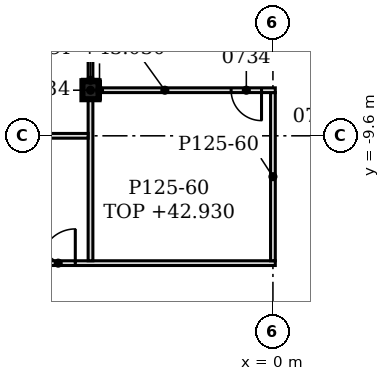
"""IFC4 building model, lengths in metres.
Left out: names, types, materials, properties, quantities, classifications, styles, units other than length and angle.
Written with IfcOpenShell. Run it as: python <this file> out.ifc"""

import sys

from ifc_helpers import new_model, si_unit, direction, frame, frame_2d, origin, origin_2d, place, context, subcontext, project, spatial, polyline, rectangle, i_section, outline, extrude, element, fill, save


model = new_model("IFC4")
c1 = context("Model", 3, precision=1e-05, world=origin(), true_north=direction((0.0, 1.0)))
c2 = subcontext(c1, "Body", "Model", "MODEL_VIEW")
j1 = project(units=[si_unit("LENGTHUNIT", "METRE"), si_unit("PLANEANGLEUNIT", "RADIAN")], contexts=[c1])
p1 = place(None, origin())
s1 = spatial("IfcSite", under=j1, at=p1, CompositionType="ELEMENT")
p2 = place(p1, origin())
s2 = spatial("IfcBuilding", under=s1, at=p2, CompositionType="ELEMENT")
p3 = place(p2, frame((0.0, 0.0, 40.2)))
s3 = spatial("IfcBuildingStorey", under=s2, at=p3, CompositionType="ELEMENT", Elevation=40.2)
p4 = place(p3, frame((-4.8, -8.4, -0.15), z_axis=(0.0, 0.0, 1.0), x_axis=(1.0, 0.0, 0.0)))
e1 = element("IfcColumn", 1, at=p4, inside=s3, PredefinedType="COLUMN", context=c2, shape_type="SweptSolid", body=[
    extrude(i_section(OverallWidth=0.424, OverallDepth=0.474, WebThickness=0.048, FlangeThickness=0.077, FilletRadius=0.015, at=origin_2d()), origin(), (0.0, 0.0, 1.0), 3.6),
])
p5 = place(p3, frame((-17.812, -12.95, 0.0), z_axis=(0.0, 0.0, 1.0), x_axis=(1.0, 0.0, 0.0)))
e2 = element("IfcWall", 2, at=p5, inside=s3, PredefinedType="PARTITIONING", context=c2, shape_type="SweptSolid", body=[
    extrude(outline(polyline([(0.0, 0.0), (17.875, 0.0), (17.875, 3.45), (13.163, 3.45), (13.16, 2.73), (12.863, 2.73), (12.861, 3.45), (3.562, 3.45), (3.561, 2.93), (3.262, 2.93), (3.26, 3.45), (0.0, 3.45), (0.0, 0.0)])), frame((0.0, 0.062, 0.0), z_axis=(0.0, -1.0, 0.0), x_axis=(1.0, 0.0, 0.0)), (0.0, 0.0, 1.0), 0.125),
])
p6 = place(p5, frame((11.712, 0.0, 0.0)))
e3 = element("IfcOpeningElement", 3, at=p6, cuts=e2, PredefinedType="OPENING", context=c2, shape_type="SweptSolid", body=[
    extrude(rectangle(XDim=0.9, YDim=2.1, at=frame_2d((0.45, 1.05))), frame((0.0, 0.073, 0.0), z_axis=(0.0, -1.0, 0.0), x_axis=(1.0, 0.0, 0.0)), (0.0, 0.0, 1.0), 0.145),
])
p7 = place(p3, frame((-4.8, -12.887, 0.0), z_axis=(0.0, 0.0, 1.0), x_axis=(0.0, 1.0, 0.0)))
e4 = element("IfcWall", 4, at=p7, inside=s3, PredefinedType="PARTITIONING", context=c2, shape_type="SweptSolid", body=[
    extrude(rectangle(XDim=4.25, YDim=0.125, at=frame_2d((2.125, 0.0))), origin(), (0.0, 0.0, 1.0), 2.73),
])
p8 = place(p3, frame((0.0, -12.887, 0.0), z_axis=(0.0, 0.0, 1.0), x_axis=(0.0, 1.0, 0.0)))
e5 = element("IfcWall", 5, at=p8, inside=s3, PredefinedType="PARTITIONING", context=c2, shape_type="SweptSolid", body=[
    extrude(outline(polyline([(0.0, 0.0), (4.425, 0.0), (4.425, 2.83), (4.337, 2.83), (4.335, 3.45), (0.0, 3.45), (0.0, 0.0)])), frame((0.0, 0.062, 0.0), z_axis=(0.0, -1.0, 0.0), x_axis=(1.0, 0.0, 0.0)), (0.0, 0.0, 1.0), 0.125),
])
p9 = place(p3, frame((-14.196, -9.6, 0.0), z_axis=(0.0, 0.0, 1.0), x_axis=(1.0, 0.0, 0.0)))
e6 = element("IfcWall", 6, at=p9, inside=s3, PredefinedType="PARTITIONING", context=c2, shape_type="SweptSolid", body=[
    extrude(outline(polyline([(0.0, 0.0), (9.333, 0.0), (9.333, 2.73), (9.246, 2.73), (9.243, 2.93), (0.0, 2.93), (0.0, 0.0)])), frame((0.0, 0.062, 0.0), z_axis=(0.0, -1.0, 0.0), x_axis=(1.0, 0.0, 0.0)), (0.0, 0.0, 1.0), 0.125),
])
p10 = place(p3, frame((-4.588, -8.4, 0.0), z_axis=(0.0, 0.0, 1.0), x_axis=(1.0, 0.0, 0.0)))
e7 = element("IfcWall", 7, at=p10, inside=s3, PredefinedType="PARTITIONING", context=c2, shape_type="SweptSolid", body=[
    extrude(rectangle(XDim=4.65, YDim=0.125, at=frame_2d((2.325, 0.0))), origin(), (0.0, 0.0, 1.0), 2.83),
])
p11 = place(p10, frame((3.488, 0.0, 0.0)))
e8 = element("IfcOpeningElement", 8, at=p11, cuts=e7, PredefinedType="OPENING", context=c2, shape_type="SweptSolid", body=[
    extrude(rectangle(XDim=0.8, YDim=2.1, at=frame_2d((0.4, 1.05))), frame((0.0, 0.073, 0.0), z_axis=(0.0, -1.0, 0.0), x_axis=(1.0, 0.0, 0.0)), (0.0, 0.0, 1.0), 0.145),
])
p12 = place(p3, frame((-4.8, -8.163, 0.0), z_axis=(0.0, 0.0, 1.0), x_axis=(0.0, 1.0, 0.0)))
e9 = element("IfcWall", 9, at=p12, inside=s3, PredefinedType="PARTITIONING", context=c2, shape_type="SweptSolid", body=[
    extrude(rectangle(XDim=8.101, YDim=0.125, at=frame_2d((4.05, 0.0))), origin(), (0.0, 0.0, 1.0), 2.83),
])
p13 = place(p12, frame((2.163, 0.0, 0.0)))
e10 = element("IfcOpeningElement", 10, at=p13, cuts=e9, PredefinedType="OPENING", context=c2, shape_type="SweptSolid", body=[
    extrude(rectangle(XDim=0.9, YDim=2.1, at=frame_2d((0.45, 1.05))), frame((0.0, 0.073, 0.0), z_axis=(0.0, -1.0, 0.0), x_axis=(1.0, 0.0, 0.0)), (0.0, 0.0, 1.0), 0.145),
])
p14 = place(p3, frame((-4.563, -8.637, 0.0), z_axis=(0.0, 0.0, 1.0), x_axis=(0.0, 1.0, 0.0)))
e11 = element("IfcWall", 11, at=p14, inside=s3, PredefinedType="PARTITIONING", context=c2, shape_type="SweptSolid", body=[
    extrude(rectangle(XDim=0.474, YDim=0.05, at=frame_2d((0.237, 0.0))), origin(), (0.0, 0.0, 1.0), 2.83),
])
p15 = place(p3, frame((-5.012, -8.138, 0.0), z_axis=(0.0, 0.0, 1.0), x_axis=(1.0, 0.0, 0.0)))
e12 = element("IfcWall", 12, at=p15, inside=s3, PredefinedType="PARTITIONING", context=c2, shape_type="SweptSolid", body=[
    extrude(rectangle(XDim=0.424, YDim=0.05, at=frame_2d((0.212, 0.0))), origin(), (0.0, 0.0, 1.0), 2.83),
])
p16 = place(p6, origin())
e13 = element("IfcDoor", 13, at=p16, inside=s3, OperationType="SINGLE_SWING_RIGHT", PredefinedType="DOOR", context=c2, shape_type="SweptSolid", body=[
    extrude(rectangle(XDim=0.9, YDim=2.1, at=frame_2d((0.45, 1.05))), frame((0.0, 0.025, 0.0), z_axis=(0.0, -1.0, 0.0), x_axis=(1.0, 0.0, 0.0)), (0.0, 0.0, 1.0), 0.05),
])
fill(e3, e13)
p17 = place(p11, frame((0.8, 0.0, 0.0), z_axis=(0.0, 0.0, 1.0), x_axis=(-1.0, 0.0, 0.0)))
e14 = element("IfcDoor", 14, at=p17, inside=s3, OperationType="SINGLE_SWING_LEFT", PredefinedType="DOOR", context=c2, shape_type="SweptSolid", body=[
    extrude(rectangle(XDim=0.8, YDim=2.1, at=frame_2d((0.4, 1.05))), frame((0.0, 0.025, 0.0), z_axis=(0.0, -1.0, 0.0), x_axis=(1.0, 0.0, 0.0)), (0.0, 0.0, 1.0), 0.05),
])
fill(e8, e14)
save(model, sys.argv[1])
